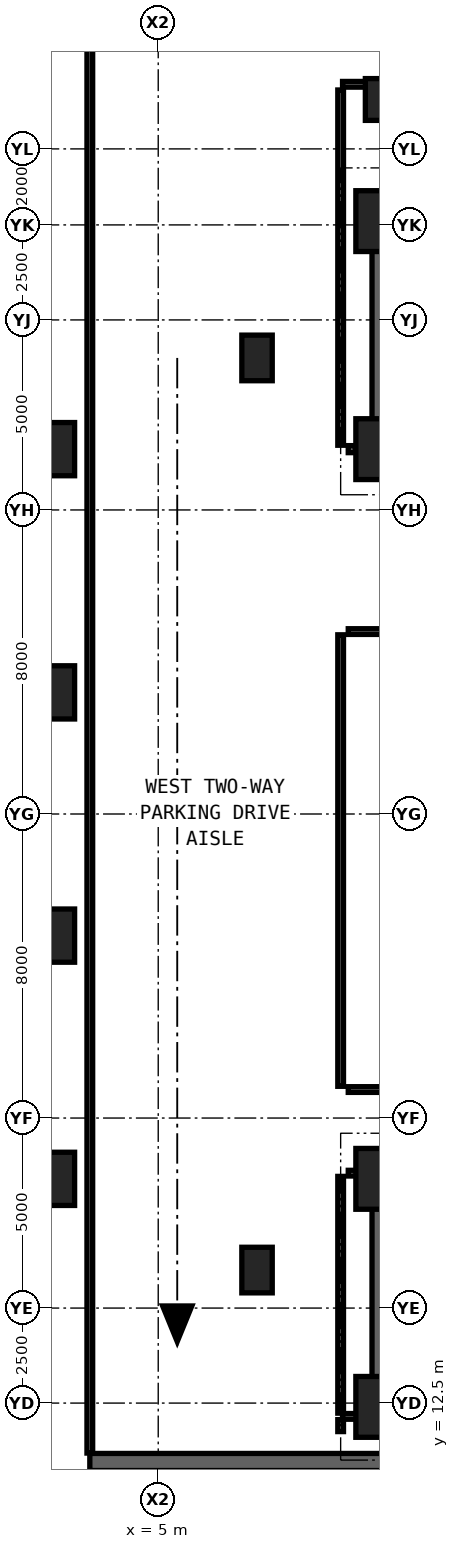
"""IFC4 building model, lengths in metres.
Left out: names, types, materials, properties, quantities, classifications, styles, units other than length and angle.
Written with IfcOpenShell. Run it as: python <this file> out.ifc"""

import sys

from ifc_helpers import new_model, si_unit, direction, frame, frame_2d, origin, origin_2d, place, context, subcontext, project, spatial, rectangle, hollow_rectangle, extrude, element, save


model = new_model("IFC4")
c1 = context("Model", 3, precision=1e-05, world=origin(), true_north=direction((0.0, 1.0)))
c2 = subcontext(c1, "Body", "Model", "MODEL_VIEW")
j1 = project(units=[si_unit("LENGTHUNIT", "METRE"), si_unit("PLANEANGLEUNIT", "RADIAN")], contexts=[c1])
p1 = place(None, origin())
s1 = spatial("IfcSite", under=j1, at=p1, CompositionType="ELEMENT")
p2 = place(p1, origin())
s2 = spatial("IfcBuilding", under=s1, at=p2, CompositionType="ELEMENT")
p3 = place(p2, frame((0.0, 0.0, -4.8)))
s3 = spatial("IfcBuildingStorey", under=s2, at=p3, CompositionType="ELEMENT", Elevation=-4.8)
for number, where, z_axis, x_axis in (
    (1, (11.0, 12.4, 0.0), (0.0, 0.0, 1.0), (1.0, 0.0, 0.0)),
    (2, (11.0, 18.4, 0.0), (0.0, 0.0, 1.0), (1.0, 0.0, 0.0)),
    (3, (11.0, 37.6, 0.0), (0.0, 0.0, 1.0), (1.0, 0.0, 0.0)),
    (4, (11.0, 43.6, 0.0), (0.0, 0.0, 1.0), (1.0, 0.0, 0.0)),
):
    element("IfcColumn", number, at=place(p3, frame(where, z_axis=z_axis, x_axis=x_axis)), inside=s3, PredefinedType="COLUMN", context=c2, shape_type="SweptSolid", body=[
        extrude(rectangle(XDim=1.6, YDim=1.6, at=origin_2d()), origin(), (0.0, 0.0, 1.0), 4.8),
    ])
for number, where, z_axis, x_axis in (
    (5, (2.1, 18.4, 0.0), (0.0, 0.0, 1.0), (1.0, 0.0, 0.0)),
    (6, (2.1, 24.8, 0.0), (0.0, 0.0, 1.0), (1.0, 0.0, 0.0)),
    (7, (2.1, 31.2, 0.0), (0.0, 0.0, 1.0), (1.0, 0.0, 0.0)),
    (8, (2.1, 37.6, 0.0), (0.0, 0.0, 1.0), (1.0, 0.0, 0.0)),
):
    element("IfcColumn", number, at=place(p3, frame(where, z_axis=z_axis, x_axis=x_axis)), inside=s3, PredefinedType="COLUMN", context=c2, shape_type="SweptSolid", body=[
        extrude(hollow_rectangle(XDim=1.4, YDim=1.4, WallThickness=0.08, at=origin_2d()), origin(), (0.0, 0.0, 1.0), 4.8),
    ])
for number, where, z_axis, x_axis in (
    (9, (7.6, 16.0, 0.0), (0.0, 0.0, 1.0), (1.0, 0.0, 0.0)),
    (10, (7.6, 40.0, 0.0), (0.0, 0.0, 1.0), (1.0, 0.0, 0.0)),
):
    element("IfcColumn", number, at=place(p3, frame(where, z_axis=z_axis, x_axis=x_axis)), inside=s3, PredefinedType="PILASTER", context=c2, shape_type="SweptSolid", body=[
        extrude(rectangle(XDim=0.8, YDim=1.2, at=origin_2d()), origin(), (0.0, 0.0, 1.0), 4.8),
    ])
for number, where, z_axis, x_axis in (
    (11, (11.0, 37.6, 0.0), (0.0, 0.0, 1.0), (0.0, 1.0, 0.0)),
    (12, (11.0, 12.4, 0.0), (0.0, 0.0, 1.0), (0.0, 1.0, 0.0)),
):
    element("IfcWall", number, at=place(p3, frame(where, z_axis=z_axis, x_axis=x_axis)), inside=s3, PredefinedType="SHEAR", context=c2, shape_type="SweptSolid", body=[
        extrude(rectangle(XDim=6.0, YDim=0.75, at=frame_2d((3.0, 0.0))), origin(), (0.0, 0.0, 1.0), 4.48),
    ])
p4 = place(p3, frame((11.0, 46.8, 0.0), z_axis=(0.0, 0.0, 1.0), x_axis=(1.0, 0.0, 0.0)))
e13 = element("IfcColumn", 13, at=p4, inside=s3, PredefinedType="COLUMN", context=c2, shape_type="SweptSolid", body=[
    extrude(rectangle(XDim=1.1, YDim=1.1, at=origin_2d()), origin(), (0.0, 0.0, 1.0), 4.8),
])
p5 = place(p3, frame((3.2, 10.95, 0.0), z_axis=(0.0, 0.0, 1.0), x_axis=(1.0, 0.0, 0.0)))
e14 = element("IfcWall", 14, at=p5, inside=s3, PredefinedType="SHEAR", context=c2, shape_type="SweptSolid", body=[
    extrude(rectangle(XDim=90.8, YDim=0.45, at=frame_2d((45.4, 0.0))), origin(), (0.0, 0.0, 1.0), 4.48),
])
p6 = place(p5, frame((18.57, 0.0, 0.0)))
e15 = element("IfcOpeningElement", 15, at=p6, cuts=e14, PredefinedType="OPENING", context=c2, shape_type="SweptSolid", body=[
    extrude(rectangle(XDim=1.15, YDim=2.2, at=frame_2d((0.575, 1.1))), frame((0.0, 0.235, 0.0), z_axis=(0.0, -1.0, 0.0), x_axis=(1.0, 0.0, 0.0)), (0.0, 0.0, 1.0), 0.47),
])
p7 = place(p5, frame((66.17, 0.0, 0.0)))
e16 = element("IfcOpeningElement", 16, at=p7, cuts=e14, PredefinedType="OPENING", context=c2, shape_type="SweptSolid", body=[
    extrude(rectangle(XDim=1.15, YDim=2.2, at=frame_2d((0.575, 1.1))), frame((0.0, 0.235, 0.0), z_axis=(0.0, -1.0, 0.0), x_axis=(1.0, 0.0, 0.0)), (0.0, 0.0, 1.0), 0.47),
])
p8 = place(p5, frame((31.0, 0.0, 0.0)))
e17 = element("IfcOpeningElement", 17, at=p8, cuts=e14, PredefinedType="OPENING", context=c2, shape_type="SweptSolid", body=[
    extrude(rectangle(XDim=1.2, YDim=2.25, at=frame_2d((0.6, 1.125))), frame((0.0, 0.235, 0.0), z_axis=(0.0, -1.0, 0.0), x_axis=(1.0, 0.0, 0.0)), (0.0, 0.0, 1.0), 0.47),
])
p9 = place(p5, frame((52.45, 0.0, 0.0)))
e18 = element("IfcOpeningElement", 18, at=p9, cuts=e14, PredefinedType="OPENING", context=c2, shape_type="SweptSolid", body=[
    extrude(rectangle(XDim=1.2, YDim=2.25, at=frame_2d((0.6, 1.125))), frame((0.0, 0.235, 0.0), z_axis=(0.0, -1.0, 0.0), x_axis=(1.0, 0.0, 0.0)), (0.0, 0.0, 1.0), 0.47),
])
p10 = place(p3, frame((9.85, 12.15, 0.0), z_axis=(0.0, 0.0, 1.0), x_axis=(1.0, 0.0, 0.0)))
e19 = element("IfcWall", 19, at=p10, inside=s3, PredefinedType="PARTITIONING", context=c2, shape_type="SweptSolid", body=[
    extrude(rectangle(XDim=1.13, YDim=0.15, at=frame_2d((0.565, 0.0))), origin(), (0.0, 0.0, 1.0), 3.519),
])
p11 = place(p3, frame((10.0, 18.55, 0.0), z_axis=(0.0, 0.0, 1.0), x_axis=(1.0, 0.0, 0.0)))
e20 = element("IfcWall", 20, at=p11, inside=s3, PredefinedType="PARTITIONING", context=c2, shape_type="SweptSolid", body=[
    extrude(rectangle(XDim=0.98, YDim=0.15, at=frame_2d((0.49, 0.0))), origin(), (0.0, 0.0, 1.0), 3.372),
])
p12 = place(p3, frame((10.0, 20.75, 0.0), z_axis=(0.0, 0.0, 1.0), x_axis=(1.0, 0.0, 0.0)))
e21 = element("IfcWall", 21, at=p12, inside=s3, PredefinedType="PARTITIONING", context=c2, shape_type="SweptSolid", body=[
    extrude(rectangle(XDim=33.2, YDim=0.15, at=frame_2d((16.6, 0.0))), origin(), (0.0, 0.0, 1.0), 3.252),
])
p13 = place(p12, frame((14.4, 0.0, 0.0)))
e22 = element("IfcOpeningElement", 22, at=p13, cuts=e21, PredefinedType="OPENING", context=c2, shape_type="SweptSolid", body=[
    extrude(rectangle(XDim=1.6, YDim=2.3, at=frame_2d((0.8, 1.15))), frame((0.0, 0.085, 0.0), z_axis=(0.0, -1.0, 0.0), x_axis=(1.0, 0.0, 0.0)), (0.0, 0.0, 1.0), 0.17),
])
p14 = place(p3, frame((10.0, 32.8, 0.0), z_axis=(0.0, 0.0, 1.0), x_axis=(1.0, 0.0, 0.0)))
e23 = element("IfcWall", 23, at=p14, inside=s3, PredefinedType="PARTITIONING", context=c2, shape_type="SweptSolid", body=[
    extrude(rectangle(XDim=14.8, YDim=0.15, at=frame_2d((7.4, 0.0))), origin(), (0.0, 0.0, 1.0), 3.432),
])
p15 = place(p14, frame((5.05, 0.0, 0.0)))
e24 = element("IfcOpeningElement", 24, at=p15, cuts=e23, PredefinedType="OPENING", context=c2, shape_type="SweptSolid", body=[
    extrude(rectangle(XDim=1.6, YDim=2.3, at=frame_2d((0.8, 1.15))), frame((0.0, 0.085, 0.0), z_axis=(0.0, -1.0, 0.0), x_axis=(1.0, 0.0, 0.0)), (0.0, 0.0, 1.0), 0.17),
])
p16 = place(p3, frame((10.0, 37.6, 0.0), z_axis=(0.0, 0.0, 1.0), x_axis=(1.0, 0.0, 0.0)))
e25 = element("IfcWall", 25, at=p16, inside=s3, PredefinedType="SHEAR", context=c2, shape_type="SweptSolid", body=[
    extrude(rectangle(XDim=0.185, YDim=0.185, at=frame_2d((0.093, 0.0))), origin(), (0.0, 0.0, 1.0), 4.48),
])
p17 = place(p3, frame((9.85, 47.2, 0.0), z_axis=(0.0, 0.0, 1.0), x_axis=(1.0, 0.0, 0.0)))
e26 = element("IfcWall", 26, at=p17, inside=s3, PredefinedType="PARTITIONING", context=c2, shape_type="SweptSolid", body=[
    extrude(rectangle(XDim=33.3, YDim=0.15, at=frame_2d((16.65, 0.0))), origin(), (0.0, 0.0, 1.0), 4.3),
])
p18 = place(p3, frame((3.2, 11.185, 0.0), z_axis=(0.0, 0.0, 1.0), x_axis=(0.0, 1.0, 0.0)))
e27 = element("IfcWall", 27, at=p18, inside=s3, PredefinedType="PARTITIONING", context=c2, shape_type="SweptSolid", body=[
    extrude(rectangle(XDim=42.43, YDim=0.15, at=frame_2d((21.215, 0.0))), origin(), (0.0, 0.0, 1.0), 3.372),
])
p19 = place(p3, frame((9.8, 11.75, 0.0), z_axis=(0.0, 0.0, 1.0), x_axis=(0.0, 1.0, 0.0)))
e28 = element("IfcWall", 28, at=p19, inside=s3, PredefinedType="PARTITIONING", context=c2, shape_type="SweptSolid", body=[
    extrude(rectangle(XDim=0.315, YDim=0.15, at=frame_2d((0.157, 0.0))), origin(), (0.0, 0.0, 1.0), 4.3),
])
p20 = place(p3, frame((9.8, 12.235, 0.0), z_axis=(0.0, 0.0, 1.0), x_axis=(0.0, 1.0, 0.0)))
e29 = element("IfcWall", 29, at=p20, inside=s3, PredefinedType="PARTITIONING", context=c2, shape_type="SweptSolid", body=[
    extrude(rectangle(XDim=6.23, YDim=0.15, at=frame_2d((3.115, 0.0))), origin(), (0.0, 0.0, 1.0), 3.372),
])
p21 = place(p3, frame((9.8, 20.835, 0.0), z_axis=(0.0, 0.0, 1.0), x_axis=(0.0, 1.0, 0.0)))
e30 = element("IfcWall", 30, at=p21, inside=s3, PredefinedType="PARTITIONING", context=c2, shape_type="SweptSolid", body=[
    extrude(rectangle(XDim=11.88, YDim=0.15, at=frame_2d((5.94, 0.0))), origin(), (0.0, 0.0, 1.0), 3.699),
])
p22 = place(p3, frame((9.8, 37.702, 0.0), z_axis=(0.0, 0.0, 1.0), x_axis=(0.0, 1.0, 0.0)))
e31 = element("IfcWall", 31, at=p22, inside=s3, PredefinedType="PARTITIONING", context=c2, shape_type="SweptSolid", body=[
    extrude(rectangle(XDim=9.348, YDim=0.15, at=frame_2d((4.674, 0.0))), origin(), (0.0, 0.0, 1.0), 3.372),
])
save(model, sys.argv[1])
